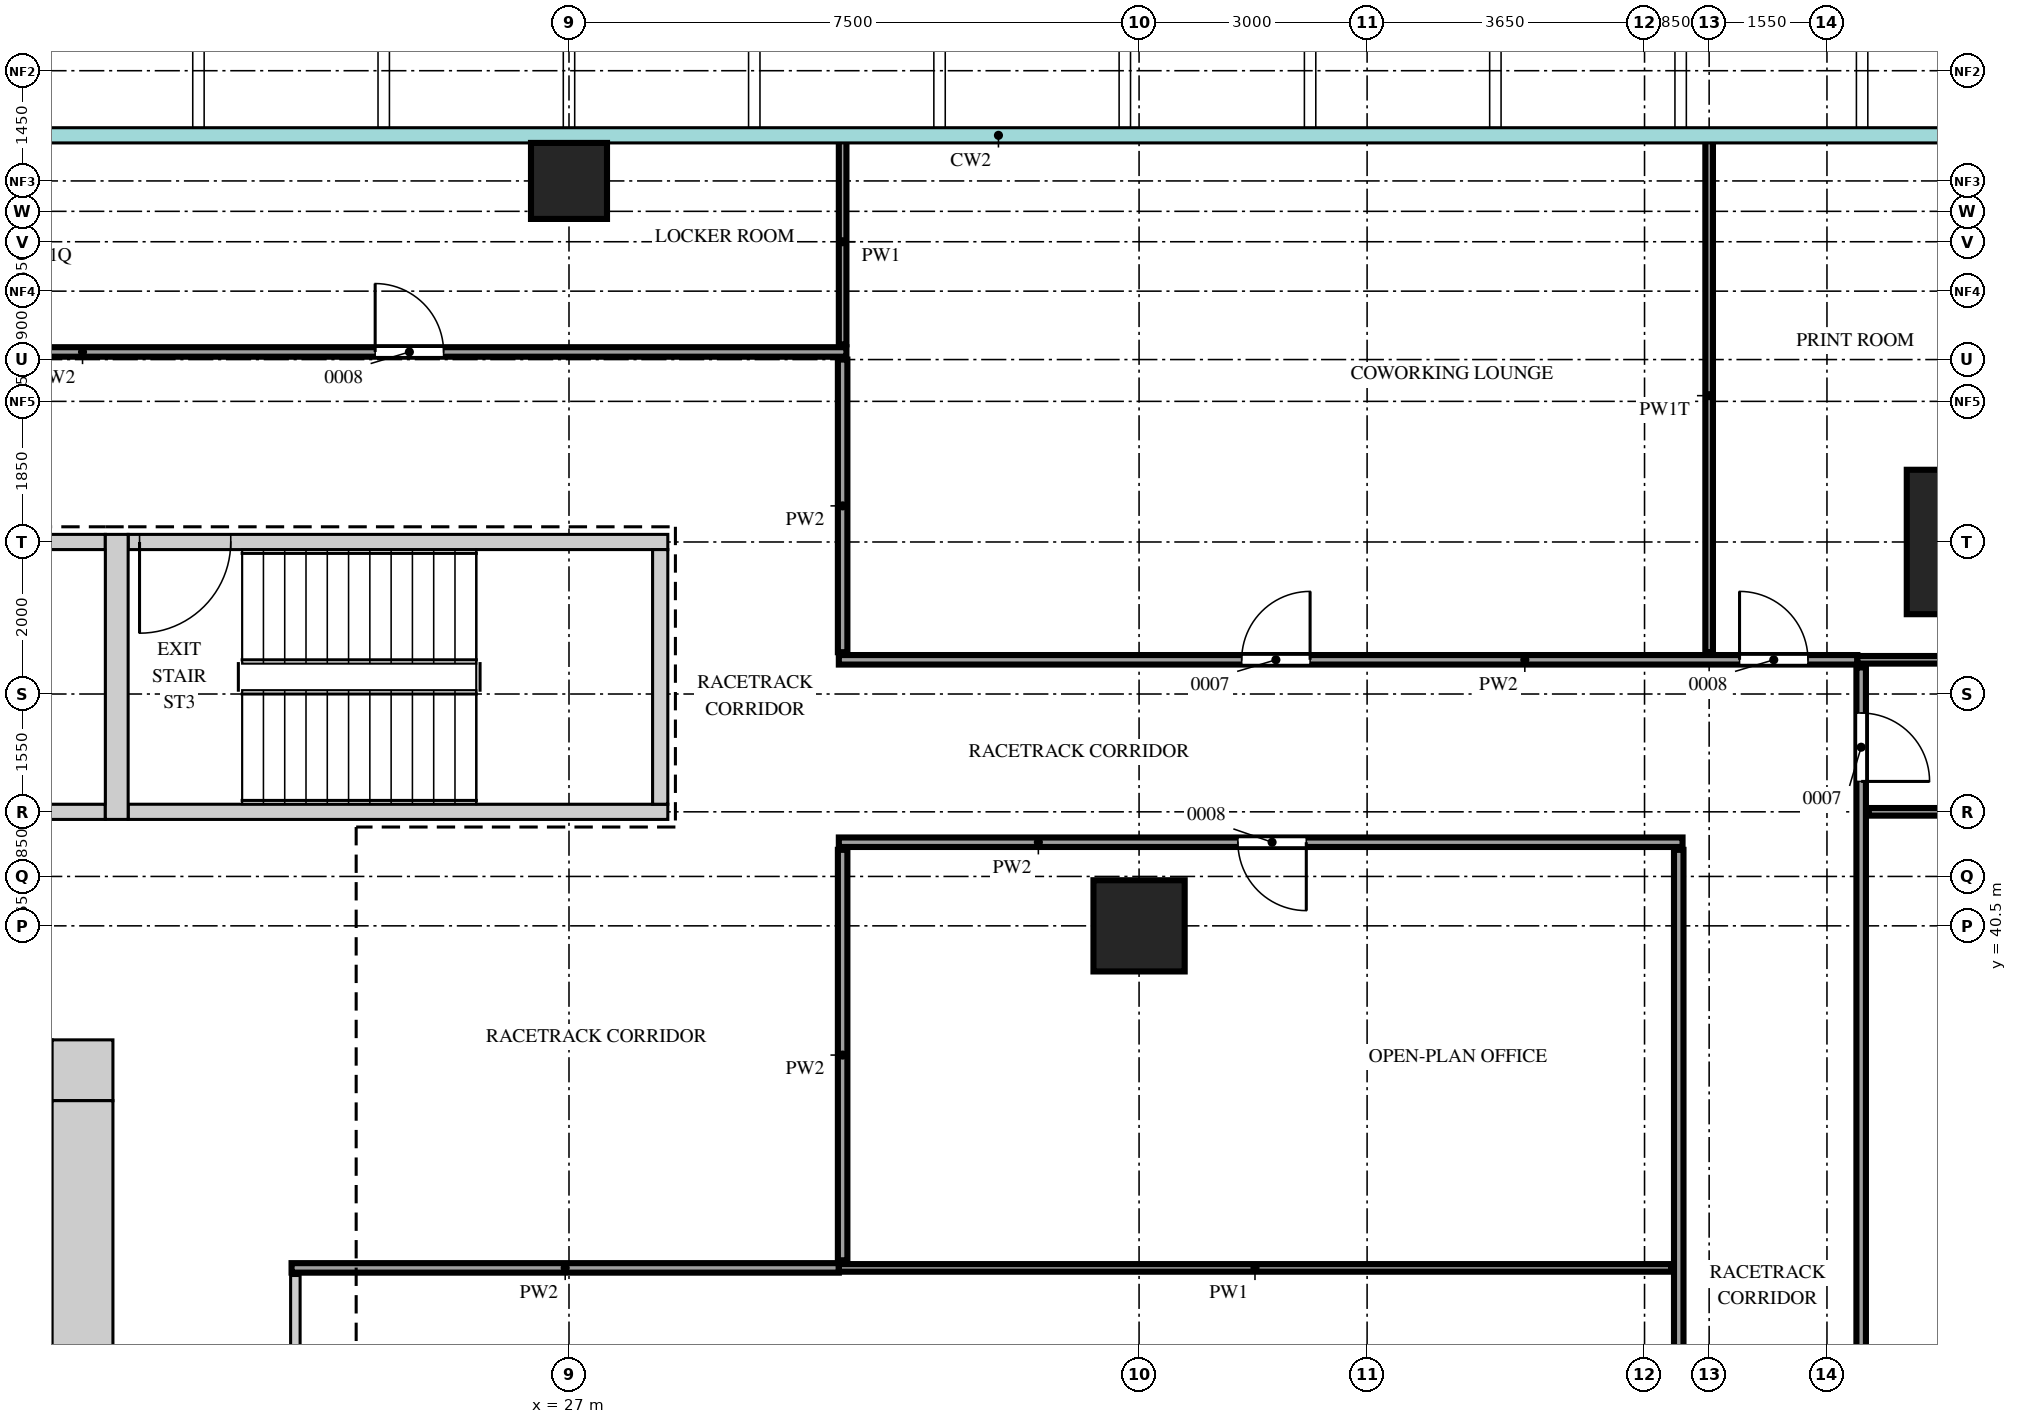
"""IFC4 building model, lengths in metres.
Left out: names, types, materials, properties, quantities, classifications, styles, units other than length and angle.
Written with IfcOpenShell. Run it as: python <this file> out.ifc"""

import sys

from ifc_helpers import new_model, si_unit, direction, frame, frame_2d, origin, origin_2d, place, context, subcontext, project, spatial, rectangle, extrude, source, transform, mapped, element, fill, save


model = new_model("IFC4")
c1 = context("Model", 3, precision=1e-05, world=origin(), true_north=direction((0.0, 1.0)))
c2 = subcontext(c1, "Body", "Model", "MODEL_VIEW")
j1 = project(units=[si_unit("LENGTHUNIT", "METRE"), si_unit("PLANEANGLEUNIT", "RADIAN")], contexts=[c1])
p1 = place(None, origin())
s1 = spatial("IfcSite", under=j1, at=p1, CompositionType="ELEMENT")
p2 = place(p1, origin())
s2 = spatial("IfcBuilding", under=s1, at=p2, CompositionType="ELEMENT")
p3 = place(p2, frame((0.0, 0.0, 188.7)))
s3 = spatial("IfcBuildingStorey", under=s2, at=p3, CompositionType="ELEMENT", Elevation=188.7)
m1 = source(origin(), c2, "Body", "SweptSolid", [
    extrude(rectangle(XDim=0.8, YDim=0.8, at=frame_2d((0.4, 0.0))), origin(), (0.0, 0.0, 1.0), 3.75),
])
p4 = place(p3, frame((20.2, 38.6, 0.0), z_axis=(0.0, 0.0, 1.0), x_axis=(1.0, 0.0, 0.0)))
e1 = element("IfcWall", 1, at=p4, inside=s3, PredefinedType="SHEAR", context=c2, shape_type="MappedRepresentation", body=[
    mapped(m1, transform((0.0, 0.0, 0.0))),
])
m2 = source(origin(), c2, "Body", "SweptSolid", [
    extrude(rectangle(XDim=22.4, YDim=0.8, at=frame_2d((11.2, 0.0))), origin(), (0.0, 0.0, 1.0), 3.75),
])
p5 = place(p3, frame((20.6, 15.8, 0.0), z_axis=(0.0, 0.0, 1.0), x_axis=(0.0, 1.0, 0.0)))
e2 = element("IfcWall", 2, at=p5, inside=s3, PredefinedType="SHEAR", context=c2, shape_type="MappedRepresentation", body=[
    mapped(m2, transform((0.0, 0.0, 0.0))),
])
m3 = source(origin(), c2, "Body", "SweptSolid", [
    extrude(rectangle(XDim=1.8, YDim=2.1, at=frame_2d((0.9, 1.05))), frame((0.0, 0.41, 0.0), z_axis=(0.0, -1.0, 0.0), x_axis=(1.0, 0.0, 0.0)), (0.0, 0.0, 1.0), 0.82),
])
p6 = place(p5, frame((10.7, 0.0, 0.0)))
e3 = element("IfcOpeningElement", 3, at=p6, cuts=e2, PredefinedType="OPENING", context=c2, shape_type="MappedRepresentation", body=[
    mapped(m3, transform((0.0, 0.0, 0.0))),
])
m4 = source(origin(), c2, "Body", "SweptSolid", [
    extrude(rectangle(XDim=0.9, YDim=2.1, at=frame_2d((0.45, 1.05))), frame((0.0, 0.41, 0.0), z_axis=(0.0, -1.0, 0.0), x_axis=(1.0, 0.0, 0.0)), (0.0, 0.0, 1.0), 0.82),
])
p7 = place(p5, frame((0.35, 0.0, 0.0)))
e4 = element("IfcOpeningElement", 4, at=p7, cuts=e2, PredefinedType="OPENING", context=c2, shape_type="MappedRepresentation", body=[
    mapped(m4, transform((0.0, 0.0, 0.0))),
])
p8 = place(p5, frame((2.15, 0.0, 0.0)))
e5 = element("IfcOpeningElement", 5, at=p8, cuts=e2, PredefinedType="OPENING", context=c2, shape_type="MappedRepresentation", body=[
    mapped(m4, transform((0.0, 0.0, 0.0))),
])
m5 = source(origin(), c2, "Body", "SweptSolid", [
    extrude(rectangle(XDim=1.0, YDim=2.1, at=frame_2d((0.5, 1.05))), frame((0.0, 0.41, 0.0), z_axis=(0.0, -1.0, 0.0), x_axis=(1.0, 0.0, 0.0)), (0.0, 0.0, 1.0), 0.82),
])
p9 = place(p5, frame((4.85, 0.0, 0.0)))
e6 = element("IfcOpeningElement", 6, at=p9, cuts=e2, PredefinedType="OPENING", context=c2, shape_type="MappedRepresentation", body=[
    mapped(m5, transform((0.0, 0.0, 0.0))),
])
m6 = source(origin(), c2, "Body", "SweptSolid", [
    extrude(rectangle(XDim=7.0, YDim=0.2, at=frame_2d((3.5, 0.0))), origin(), (0.0, 0.0, 1.0), 3.75),
])
p10 = place(p3, frame((13.9, 45.55, 0.0), z_axis=(0.0, 0.0, 1.0), x_axis=(1.0, 0.0, 0.0)))
e7 = element("IfcWall", 7, at=p10, inside=s3, PredefinedType="SHEAR", context=c2, shape_type="MappedRepresentation", body=[
    mapped(m6, transform((0.0, 0.0, 0.0))),
])
m7 = source(origin(), c2, "Body", "SweptSolid", [
    extrude(rectangle(XDim=1.2, YDim=2.1, at=frame_2d((0.6, 1.05))), frame((0.0, 0.11, 0.0), z_axis=(0.0, -1.0, 0.0), x_axis=(1.0, 0.0, 0.0)), (0.0, 0.0, 1.0), 0.22),
])
p11 = place(p10, frame((0.35, 0.0, 0.0)))
e8 = element("IfcOpeningElement", 8, at=p11, cuts=e7, PredefinedType="OPENING", context=c2, shape_type="MappedRepresentation", body=[
    mapped(m7, transform((0.0, 0.0, 0.0))),
])
p12 = place(p3, frame((13.9, 42.0, 0.0), z_axis=(0.0, 0.0, 1.0), x_axis=(1.0, 0.0, 0.0)))
e9 = element("IfcWall", 9, at=p12, inside=s3, PredefinedType="SHEAR", context=c2, shape_type="MappedRepresentation", body=[
    mapped(m6, transform((0.0, 0.0, 0.0))),
])
m8 = source(origin(), c2, "Body", "SweptSolid", [
    extrude(rectangle(XDim=7.1, YDim=0.2, at=frame_2d((3.55, 0.0))), origin(), (0.0, 0.0, 1.0), 3.75),
])
p13 = place(p3, frame((21.2, 45.55, 0.0), z_axis=(0.0, 0.0, 1.0), x_axis=(1.0, 0.0, 0.0)))
e10 = element("IfcWall", 10, at=p13, inside=s3, PredefinedType="SHEAR", context=c2, shape_type="MappedRepresentation", body=[
    mapped(m8, transform((0.0, 0.0, 0.0))),
])
p14 = place(p13, frame((0.15, 0.0, 0.0)))
e11 = element("IfcOpeningElement", 11, at=p14, cuts=e10, PredefinedType="OPENING", context=c2, shape_type="MappedRepresentation", body=[
    mapped(m7, transform((0.0, 0.0, 0.0))),
])
p15 = place(p3, frame((21.2, 42.0, 0.0), z_axis=(0.0, 0.0, 1.0), x_axis=(1.0, 0.0, 0.0)))
e12 = element("IfcWall", 12, at=p15, inside=s3, PredefinedType="SHEAR", context=c2, shape_type="MappedRepresentation", body=[
    mapped(m8, transform((0.0, 0.0, 0.0))),
])
m9 = source(origin(), c2, "Body", "SweptSolid", [
    extrude(rectangle(XDim=3.75, YDim=0.3, at=frame_2d((1.875, 0.0))), origin(), (0.0, 0.0, 1.0), 3.75),
])
p16 = place(p3, frame((21.05, 41.9, 0.0), z_axis=(0.0, 0.0, 1.0), x_axis=(0.0, 1.0, 0.0)))
e13 = element("IfcWall", 13, at=p16, inside=s3, PredefinedType="SHEAR", context=c2, shape_type="MappedRepresentation", body=[
    mapped(m9, transform((0.0, 0.0, 0.0))),
])
m10 = source(origin(), c2, "Body", "SweptSolid", [
    extrude(rectangle(XDim=3.35, YDim=0.2, at=frame_2d((1.675, 0.0))), origin(), (0.0, 0.0, 1.0), 3.75),
])
p17 = place(p3, frame((28.2, 42.1, 0.0), z_axis=(0.0, 0.0, 1.0), x_axis=(0.0, 1.0, 0.0)))
e14 = element("IfcWall", 14, at=p17, inside=s3, PredefinedType="SHEAR", context=c2, shape_type="MappedRepresentation", body=[
    mapped(m10, transform((0.0, 0.0, 0.0))),
])
m11 = source(origin(), c2, "Body", "SweptSolid", [
    extrude(rectangle(XDim=1.9, YDim=1.9, at=origin_2d()), origin(), (0.0, 0.0, 1.0), 4.0),
])
p18 = place(p3, frame((45.55, 45.55, 0.0), z_axis=(0.0, 0.0, 1.0), x_axis=(1.0, 0.0, 0.0)))
e15 = element("IfcColumn", 15, at=p18, inside=s3, PredefinedType="COLUMN", context=c2, shape_type="MappedRepresentation", body=[
    mapped(m11, transform((0.0, 0.0, 0.0))),
])
m12 = source(origin(), c2, "Body", "SweptSolid", [
    extrude(rectangle(XDim=1.0, YDim=1.0, at=origin_2d()), origin(), (0.0, 0.0, 1.0), 3.75),
])
p19 = place(p3, frame((27.0, 50.3, 0.0), z_axis=(0.0, 0.0, 1.0), x_axis=(1.0, 0.0, 0.0)))
e16 = element("IfcColumn", 16, at=p19, inside=s3, PredefinedType="COLUMN", context=c2, shape_type="MappedRepresentation", body=[
    mapped(m12, transform((0.0, 0.0, 0.0))),
])
m13 = source(origin(), c2, "Body", "SweptSolid", [
    extrude(rectangle(XDim=1.2, YDim=1.2, at=origin_2d()), origin(), (0.0, 0.0, 1.0), 3.75),
])
p20 = place(p3, frame((34.5, 40.5, 0.0), z_axis=(0.0, 0.0, 1.0), x_axis=(1.0, 0.0, 0.0)))
e17 = element("IfcColumn", 17, at=p20, inside=s3, PredefinedType="COLUMN", context=c2, shape_type="MappedRepresentation", body=[
    mapped(m13, transform((0.0, 0.0, 0.0))),
])
m14 = source(origin(), c2, "Body", "SweptSolid", [
    extrude(rectangle(XDim=33.8, YDim=0.125, at=frame_2d((16.9, 0.0))), origin(), (0.0, 0.0, 1.0), 3.8),
])
p21 = place(p3, frame((44.0, 10.1, 0.0), z_axis=(0.0, 0.0, 1.0), x_axis=(0.0, 1.0, 0.0)))
e18 = element("IfcWall", 18, at=p21, inside=s3, PredefinedType="PARTITIONING", context=c2, shape_type="MappedRepresentation", body=[
    mapped(m14, transform((0.0, 0.0, 0.0))),
])
m15 = source(origin(), c2, "Body", "SweptSolid", [
    extrude(rectangle(XDim=0.9, YDim=2.1, at=frame_2d((0.45, 1.05))), frame((0.0, 0.073, 0.0), z_axis=(0.0, -1.0, 0.0), x_axis=(1.0, 0.0, 0.0)), (0.0, 0.0, 1.0), 0.145),
])
p22 = place(p21, frame((5.25, 0.0, 0.0)))
e19 = element("IfcOpeningElement", 19, at=p22, cuts=e18, PredefinedType="OPENING", context=c2, shape_type="MappedRepresentation", body=[
    mapped(m15, transform((0.0, 0.0, 0.0))),
])
p23 = place(p21, frame((12.55, 0.0, 0.0)))
e20 = element("IfcOpeningElement", 20, at=p23, cuts=e18, PredefinedType="OPENING", context=c2, shape_type="MappedRepresentation", body=[
    mapped(m15, transform((0.0, 0.0, 0.0))),
])
p24 = place(p21, frame((23.6, 0.0, 0.0)))
e21 = element("IfcOpeningElement", 21, at=p24, cuts=e18, PredefinedType="OPENING", context=c2, shape_type="MappedRepresentation", body=[
    mapped(m15, transform((0.0, 0.0, 0.0))),
])
p25 = place(p21, frame((32.3, 0.0, 0.0)))
e22 = element("IfcOpeningElement", 22, at=p25, cuts=e18, PredefinedType="OPENING", context=c2, shape_type="MappedRepresentation", body=[
    mapped(m15, transform((0.0, 0.0, 0.0))),
])
m16 = source(origin(), c2, "Body", "SweptSolid", [
    extrude(rectangle(XDim=23.4, YDim=0.125, at=frame_2d((11.7, 0.0))), origin(), (0.0, 0.0, 1.0), 3.8),
])
p26 = place(p3, frame((23.4, 12.5, 0.0), z_axis=(0.0, 0.0, 1.0), x_axis=(0.0, 1.0, 0.0)))
e23 = element("IfcWall", 23, at=p26, inside=s3, PredefinedType="PARTITIONING", context=c2, shape_type="MappedRepresentation", body=[
    mapped(m16, transform((0.0, 0.0, 0.0))),
])
m17 = source(origin(), c2, "Body", "SweptSolid", [
    extrude(rectangle(XDim=1.2, YDim=2.1, at=frame_2d((0.6, 1.05))), frame((0.0, 0.073, 0.0), z_axis=(0.0, -1.0, 0.0), x_axis=(1.0, 0.0, 0.0)), (0.0, 0.0, 1.0), 0.145),
])
p27 = place(p26, frame((6.6, 0.0, 0.0)))
e24 = element("IfcOpeningElement", 24, at=p27, cuts=e23, PredefinedType="OPENING", context=c2, shape_type="MappedRepresentation", body=[
    mapped(m17, transform((0.0, 0.0, 0.0))),
])
m18 = source(origin(), c2, "Body", "SweptSolid", [
    extrude(rectangle(XDim=29.0, YDim=0.125, at=frame_2d((14.5, 0.0))), origin(), (0.0, 0.0, 1.0), 3.8),
])
p28 = place(p3, frame((41.6, 12.5, 0.0), z_axis=(0.0, 0.0, 1.0), x_axis=(0.0, 1.0, 0.0)))
e25 = element("IfcWall", 25, at=p28, inside=s3, PredefinedType="PARTITIONING", context=c2, shape_type="MappedRepresentation", body=[
    mapped(m18, transform((0.0, 0.0, 0.0))),
])
p29 = place(p28, frame((18.4, 0.0, 0.0)))
e26 = element("IfcOpeningElement", 26, at=p29, cuts=e25, PredefinedType="OPENING", context=c2, shape_type="MappedRepresentation", body=[
    mapped(m17, transform((0.0, 0.0, 0.0))),
])
m19 = source(origin(), c2, "Body", "SweptSolid", [
    extrude(rectangle(XDim=7.2, YDim=0.125, at=frame_2d((3.6, 0.0))), origin(), (0.0, 0.0, 1.0), 3.8),
])
p30 = place(p3, frame((23.35, 36.0, 0.0), z_axis=(0.0, 0.0, 1.0), x_axis=(1.0, 0.0, 0.0)))
e27 = element("IfcWall", 27, at=p30, inside=s3, PredefinedType="PARTITIONING", context=c2, shape_type="MappedRepresentation", body=[
    mapped(m19, transform((0.0, 0.0, 0.0))),
])
m20 = source(origin(), c2, "Body", "SweptSolid", [
    extrude(rectangle(XDim=10.95, YDim=0.1, at=frame_2d((5.475, 0.0))), origin(), (0.0, 0.0, 1.0), 3.8),
])
p31 = place(p3, frame((30.55, 36.0, 0.0), z_axis=(0.0, 0.0, 1.0), x_axis=(1.0, 0.0, 0.0)))
e28 = element("IfcWall", 28, at=p31, inside=s3, PredefinedType="PARTITIONING", context=c2, shape_type="MappedRepresentation", body=[
    mapped(m20, transform((0.0, 0.0, 0.0))),
])
m21 = source(origin(), c2, "Body", "SweptSolid", [
    extrude(rectangle(XDim=5.4, YDim=0.125, at=frame_2d((2.7, 0.0))), origin(), (0.0, 0.0, 1.0), 3.8),
])
p32 = place(p3, frame((30.6, 36.1, 0.0), z_axis=(0.0, 0.0, 1.0), x_axis=(0.0, 1.0, 0.0)))
e29 = element("IfcWall", 29, at=p32, inside=s3, PredefinedType="PARTITIONING", context=c2, shape_type="MappedRepresentation", body=[
    mapped(m21, transform((0.0, 0.0, 0.0))),
])
m22 = source(origin(), c2, "Body", "SweptSolid", [
    extrude(rectangle(XDim=11.1, YDim=0.125, at=frame_2d((5.55, 0.0))), origin(), (0.0, 0.0, 1.0), 3.8),
])
p33 = place(p3, frame((30.55, 41.6, 0.0), z_axis=(0.0, 0.0, 1.0), x_axis=(1.0, 0.0, 0.0)))
e30 = element("IfcWall", 30, at=p33, inside=s3, PredefinedType="PARTITIONING", context=c2, shape_type="MappedRepresentation", body=[
    mapped(m22, transform((0.0, 0.0, 0.0))),
])
p34 = place(p33, frame((5.25, 0.0, 0.0)))
e31 = element("IfcOpeningElement", 31, at=p34, cuts=e30, PredefinedType="OPENING", context=c2, shape_type="MappedRepresentation", body=[
    mapped(m15, transform((0.0, 0.0, 0.0))),
])
m23 = source(origin(), c2, "Body", "SweptSolid", [
    extrude(rectangle(XDim=6.75, YDim=0.1, at=frame_2d((3.375, 0.0))), origin(), (0.0, 0.0, 1.0), 3.8),
])
p35 = place(p3, frame((44.1, 42.0, 0.0), z_axis=(0.0, 0.0, 1.0), x_axis=(1.0, 0.0, 0.0)))
e32 = element("IfcWall", 32, at=p35, inside=s3, PredefinedType="PARTITIONING", context=c2, shape_type="MappedRepresentation", body=[
    mapped(m23, transform((0.0, 0.0, 0.0))),
])
m24 = source(origin(), c2, "Body", "SweptSolid", [
    extrude(rectangle(XDim=13.4, YDim=0.125, at=frame_2d((6.7, 0.0))), origin(), (0.0, 0.0, 1.0), 3.8),
])
p36 = place(p3, frame((30.55, 44.0, 0.0), z_axis=(0.0, 0.0, 1.0), x_axis=(1.0, 0.0, 0.0)))
e33 = element("IfcWall", 33, at=p36, inside=s3, PredefinedType="PARTITIONING", context=c2, shape_type="MappedRepresentation", body=[
    mapped(m24, transform((0.0, 0.0, 0.0))),
])
p37 = place(p36, frame((5.3, 0.0, 0.0)))
e34 = element("IfcOpeningElement", 34, at=p37, cuts=e33, PredefinedType="OPENING", context=c2, shape_type="MappedRepresentation", body=[
    mapped(m15, transform((0.0, 0.0, 0.0))),
])
p38 = place(p36, frame((11.85, 0.0, 0.0)))
e35 = element("IfcOpeningElement", 35, at=p38, cuts=e33, PredefinedType="OPENING", context=c2, shape_type="MappedRepresentation", body=[
    mapped(m15, transform((0.0, 0.0, 0.0))),
])
m25 = source(origin(), c2, "Body", "SweptSolid", [
    extrude(rectangle(XDim=6.9, YDim=0.1, at=frame_2d((3.45, 0.0))), origin(), (0.0, 0.0, 1.0), 3.8),
])
p39 = place(p3, frame((43.95, 44.0, 0.0), z_axis=(0.0, 0.0, 1.0), x_axis=(1.0, 0.0, 0.0)))
e36 = element("IfcWall", 36, at=p39, inside=s3, PredefinedType="PARTITIONING", context=c2, shape_type="MappedRepresentation", body=[
    mapped(m25, transform((0.0, 0.0, 0.0))),
])
m26 = source(origin(), c2, "Body", "SweptSolid", [
    extrude(rectangle(XDim=3.85, YDim=0.125, at=frame_2d((1.925, 0.0))), origin(), (0.0, 0.0, 1.0), 3.8),
])
p40 = place(p3, frame((30.6, 44.1, 0.0), z_axis=(0.0, 0.0, 1.0), x_axis=(0.0, 1.0, 0.0)))
e37 = element("IfcWall", 37, at=p40, inside=s3, PredefinedType="PARTITIONING", context=c2, shape_type="MappedRepresentation", body=[
    mapped(m26, transform((0.0, 0.0, 0.0))),
])
m27 = source(origin(), c2, "Body", "SweptSolid", [
    extrude(rectangle(XDim=6.75, YDim=0.1, at=frame_2d((3.375, 0.0))), origin(), (0.0, 0.0, 1.0), 3.3),
])
p41 = place(p3, frame((42.0, 44.1, 0.0), z_axis=(0.0, 0.0, 1.0), x_axis=(0.0, 1.0, 0.0)))
e38 = element("IfcWall", 38, at=p41, inside=s3, PredefinedType="PARTITIONING", context=c2, shape_type="MappedRepresentation", body=[
    mapped(m27, transform((0.0, 0.0, 0.0))),
])
m28 = source(origin(), c2, "Body", "SweptSolid", [
    extrude(rectangle(XDim=2.7, YDim=0.1, at=frame_2d((1.35, 0.0))), origin(), (0.0, 0.0, 1.0), 3.8),
])
p42 = place(p3, frame((30.6, 48.15, 0.0), z_axis=(0.0, 0.0, 1.0), x_axis=(0.0, 1.0, 0.0)))
e39 = element("IfcWall", 39, at=p42, inside=s3, PredefinedType="PARTITIONING", context=c2, shape_type="MappedRepresentation", body=[
    mapped(m28, transform((0.0, 0.0, 0.0))),
])
m29 = source(origin(), c2, "Body", "SweptSolid", [
    extrude(rectangle(XDim=13.9, YDim=0.125, at=frame_2d((6.95, 0.0))), origin(), (0.0, 0.0, 1.0), 3.8),
])
p43 = place(p3, frame((16.75, 48.05, 0.0), z_axis=(0.0, 0.0, 1.0), x_axis=(1.0, 0.0, 0.0)))
e40 = element("IfcWall", 40, at=p43, inside=s3, PredefinedType="PARTITIONING", context=c2, shape_type="MappedRepresentation", body=[
    mapped(m29, transform((0.0, 0.0, 0.0))),
])
p44 = place(p43, frame((7.7, 0.0, 0.0)))
e41 = element("IfcOpeningElement", 41, at=p44, cuts=e40, PredefinedType="OPENING", context=c2, shape_type="MappedRepresentation", body=[
    mapped(m15, transform((0.0, 0.0, 0.0))),
])
m30 = source(origin(), c2, "Body", "SweptSolid", [
    extrude(rectangle(XDim=0.9, YDim=2.1, at=frame_2d((0.45, 1.05))), frame((0.0, 0.025, 0.0), z_axis=(0.0, -1.0, 0.0), x_axis=(1.0, 0.0, 0.0)), (0.0, 0.0, 1.0), 0.05),
])
p45 = place(p25, origin())
e42 = element("IfcDoor", 42, at=p45, inside=s3, OperationType="SINGLE_SWING_LEFT", PredefinedType="DOOR", context=c2, shape_type="MappedRepresentation", body=[
    mapped(m30, transform((0.0, 0.0, 0.0))),
])
fill(e22, e42)
p46 = place(p37, origin())
e43 = element("IfcDoor", 43, at=p46, inside=s3, OperationType="SINGLE_SWING_LEFT", PredefinedType="DOOR", context=c2, shape_type="MappedRepresentation", body=[
    mapped(m30, transform((0.0, 0.0, 0.0))),
])
fill(e34, e43)
p47 = place(p38, origin())
e44 = element("IfcDoor", 44, at=p47, inside=s3, OperationType="SINGLE_SWING_RIGHT", PredefinedType="DOOR", context=c2, shape_type="MappedRepresentation", body=[
    mapped(m30, transform((0.0, 0.0, 0.0))),
])
fill(e35, e44)
p48 = place(p34, origin())
e45 = element("IfcDoor", 45, at=p48, inside=s3, OperationType="SINGLE_SWING_RIGHT", PredefinedType="DOOR", context=c2, shape_type="MappedRepresentation", body=[
    mapped(m30, transform((0.0, 0.0, 0.0))),
])
fill(e31, e45)
p49 = place(p44, origin())
e46 = element("IfcDoor", 46, at=p49, inside=s3, OperationType="SINGLE_SWING_RIGHT", PredefinedType="DOOR", context=c2, shape_type="MappedRepresentation", body=[
    mapped(m30, transform((0.0, 0.0, 0.0))),
])
fill(e41, e46)
m31 = source(origin(), c2, "Body", "SweptSolid", [
    extrude(rectangle(XDim=1.2, YDim=2.1, at=frame_2d((0.6, 1.05))), frame((0.0, 0.025, 0.0), z_axis=(0.0, -1.0, 0.0), x_axis=(1.0, 0.0, 0.0)), (0.0, 0.0, 1.0), 0.05),
])
p50 = place(p14, origin())
e47 = element("IfcDoor", 47, at=p50, inside=s3, OperationType="SINGLE_SWING_LEFT", PredefinedType="DOOR", context=c2, shape_type="MappedRepresentation", body=[
    mapped(m31, transform((0.0, 0.0, 0.0))),
])
fill(e11, e47)
save(model, sys.argv[1])
